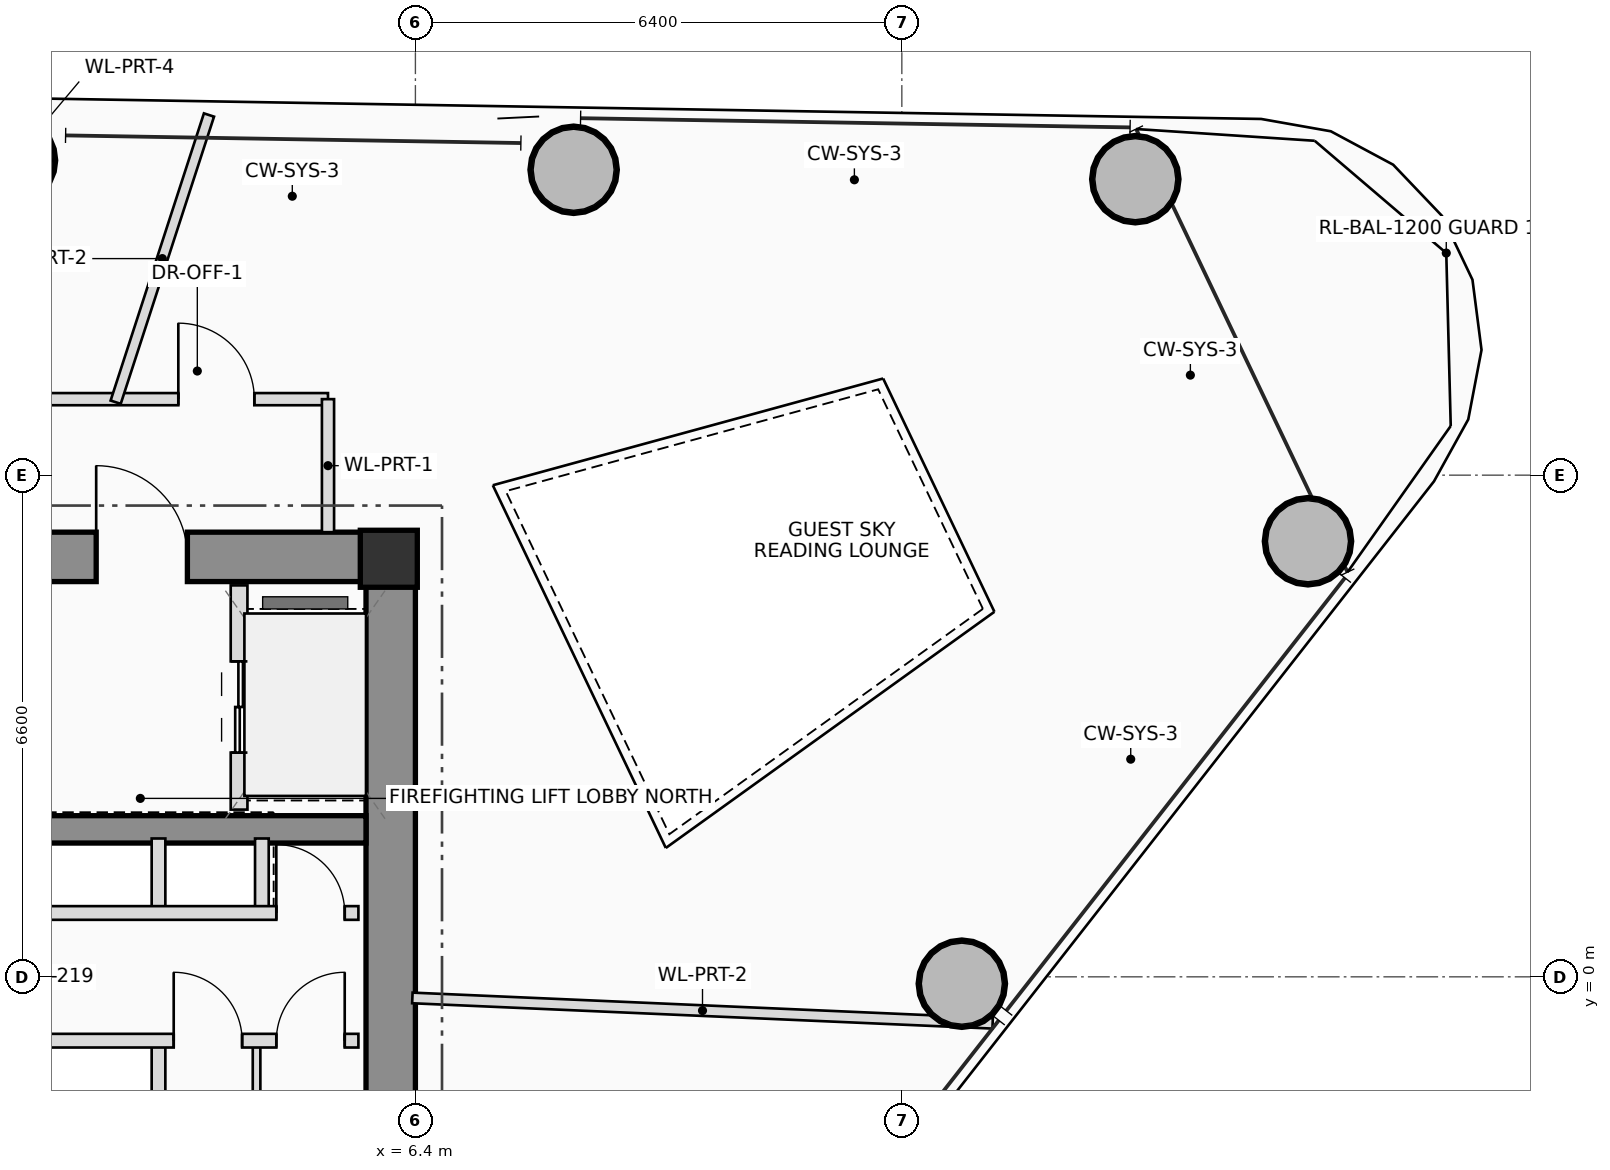
"""IFC4 building model, lengths in metres.
Left out: names, types, materials, properties, quantities, classifications, styles, units other than length and angle.
Written with IfcOpenShell. Run it as: python <this file> out.ifc"""

import sys

from ifc_helpers import new_model, si_unit, direction, frame, frame_2d, origin, origin_2d, place, context, subcontext, project, spatial, rectangle, hollow_circle, extrude, source, transform, mapped, element, fill, save


model = new_model("IFC4")
c1 = context("Model", 3, precision=1e-05, world=origin(), true_north=direction((0.0, 1.0)))
c2 = subcontext(c1, "Body", "Model", "MODEL_VIEW")
j1 = project(units=[si_unit("LENGTHUNIT", "METRE"), si_unit("PLANEANGLEUNIT", "RADIAN")], contexts=[c1])
p1 = place(None, origin())
s1 = spatial("IfcSite", under=j1, at=p1, CompositionType="ELEMENT")
p2 = place(p1, origin())
s2 = spatial("IfcBuilding", under=s1, at=p2, CompositionType="ELEMENT")
p3 = place(p2, frame((0.0, 0.0, 215.6)))
s3 = spatial("IfcBuildingStorey", under=s2, at=p3, CompositionType="ELEMENT", Elevation=215.6)
m1 = source(origin(), c2, "Body", "SweptSolid", [
    extrude(rectangle(XDim=0.75, YDim=0.75, at=origin_2d()), origin(), (0.0, 0.0, 1.0), 3.45),
])
p4 = place(p3, frame((6.05, 5.5, 0.0), z_axis=(0.0, 0.0, 1.0), x_axis=(1.0, 0.0, 0.0)))
e1 = element("IfcColumn", 1, at=p4, inside=s3, PredefinedType="COLUMN", context=c2, shape_type="MappedRepresentation", body=[
    mapped(m1, transform((0.0, 0.0, 0.0), scale=1.0)),
])
p5 = place(p3, frame((-6.4, 5.525, 0.0), z_axis=(0.0, 0.0, 1.0), x_axis=(1.0, 0.0, 0.0)))
e2 = element("IfcWall", 2, at=p5, inside=s3, PredefinedType="SHEAR", context=c2, shape_type="SweptSolid", body=[
    extrude(rectangle(XDim=12.8, YDim=0.65, at=frame_2d((6.4, 0.0))), origin(), (0.0, 0.0, 1.0), 3.45),
])
p6 = place(p5, frame((8.6, 0.0, 0.0)))
e3 = element("IfcOpeningElement", 3, at=p6, cuts=e2, PredefinedType="OPENING", context=c2, shape_type="SweptSolid", body=[
    extrude(rectangle(XDim=1.2, YDim=2.2, at=frame_2d((0.6, 1.1))), frame((0.0, 0.335, 0.0), z_axis=(0.0, -1.0, 0.0), x_axis=(1.0, 0.0, 0.0)), (0.0, 0.0, 1.0), 0.67),
])
p7 = place(p3, frame((6.075, -5.2, 0.0), z_axis=(0.0, 0.0, 1.0), x_axis=(0.0, 1.0, 0.0)))
e4 = element("IfcWall", 4, at=p7, inside=s3, PredefinedType="SHEAR", context=c2, shape_type="SweptSolid", body=[
    extrude(rectangle(XDim=10.4, YDim=0.65, at=frame_2d((5.2, 0.0))), origin(), (0.0, 0.0, 1.0), 3.45),
])
p8 = place(p3, frame((-5.75, 1.94, 0.0), z_axis=(0.0, 0.0, 1.0), x_axis=(1.0, 0.0, 0.0)))
e5 = element("IfcWall", 5, at=p8, inside=s3, PredefinedType="SHEAR", context=c2, shape_type="SweptSolid", body=[
    extrude(rectangle(XDim=11.5, YDim=0.36, at=frame_2d((5.75, 0.0))), origin(), (0.0, 0.0, 1.0), 3.45),
])
m2 = source(origin(), c2, "Body", "SweptSolid", [
    extrude(hollow_circle(Radius=0.575, WallThickness=0.042, at=origin_2d()), origin(), (0.0, 0.0, 1.0), 3.45),
])
for number, where, z_axis, x_axis in (
    (6, (13.59, -0.09, 0.0), (0.0, 0.0, 1.0), (1.0, 0.0, 0.0)),
    (7, (18.144, 5.731, 0.0), (0.0, 0.0, 1.0), (1.0, 0.0, 0.0)),
    (8, (15.872, 10.494, 0.0), (0.0, 0.0, 1.0), (1.0, 0.0, 0.0)),
    (9, (8.482, 10.618, 0.0), (0.0, 0.0, 1.0), (1.0, 0.0, 0.0)),
    (10, (1.092, 10.742, 0.0), (0.0, 0.0, 1.0), (1.0, 0.0, 0.0)),
):
    element("IfcColumn", number, at=place(p3, frame(where, z_axis=z_axis, x_axis=x_axis)), inside=s3, PredefinedType="COLUMN", context=c2, shape_type="MappedRepresentation", body=[
        mapped(m2, transform((0.0, 0.0, 0.0), scale=1.0)),
    ])
p9 = place(p3, frame((4.08, 2.2, 0.0), z_axis=(0.0, 0.0, 1.0), x_axis=(0.0, 1.0, 0.0)))
e11 = element("IfcWall", 11, at=p9, inside=s3, PredefinedType="PLUMBINGWALL", context=c2, shape_type="SweptSolid", body=[
    extrude(rectangle(XDim=2.95, YDim=0.22, at=frame_2d((1.475, 0.0))), origin(), (0.0, 0.0, 1.0), 3.21),
])
p10 = place(p9, frame((0.75, 0.0, 0.0)))
e12 = element("IfcOpeningElement", 12, at=p10, cuts=e11, PredefinedType="OPENING", context=c2, shape_type="SweptSolid", body=[
    extrude(rectangle(XDim=1.2, YDim=2.25, at=frame_2d((0.6, 1.125))), frame((0.0, 0.12, 0.0), z_axis=(0.0, -1.0, 0.0), x_axis=(1.0, 0.0, 0.0)), (0.0, 0.0, 1.0), 0.24),
])
for number, where, z_axis, x_axis in (
    (13, (3.02, 0.84, 0.0), (0.0, 0.0, 1.0), (0.0, 1.0, 0.0)),
    (14, (4.38, 0.84, 0.0), (0.0, 0.0, 1.0), (0.0, 1.0, 0.0)),
    (15, (3.02, -1.82, 0.0), (0.0, 0.0, 1.0), (0.0, 1.0, 0.0)),
):
    element("IfcWall", number, at=place(p3, frame(where, z_axis=z_axis, x_axis=x_axis)), inside=s3, PredefinedType="PLUMBINGWALL", context=c2, shape_type="SweptSolid", body=[
        extrude(rectangle(XDim=0.98, YDim=0.18, at=frame_2d((0.49, 0.0))), origin(), (0.0, 0.0, 1.0), 3.21),
    ])
p11 = place(p3, frame((4.31, -1.82, 0.0), z_axis=(0.0, 0.0, 1.0), x_axis=(0.0, 1.0, 0.0)))
e16 = element("IfcWall", 16, at=p11, inside=s3, PredefinedType="PARTITIONING", context=c2, shape_type="SweptSolid", body=[
    extrude(rectangle(XDim=0.98, YDim=0.1, at=frame_2d((0.49, 0.0))), origin(), (0.0, 0.0, 1.0), 3.21),
])
p12 = place(p3, frame((-5.68, 0.84, 0.0), z_axis=(0.0, 0.0, 1.0), x_axis=(1.0, 0.0, 0.0)))
e17 = element("IfcWall", 17, at=p12, inside=s3, PredefinedType="PLUMBINGWALL", context=c2, shape_type="SweptSolid", body=[
    extrude(rectangle(XDim=11.33, YDim=0.18, at=frame_2d((5.665, 0.0))), origin(), (0.0, 0.0, 1.0), 3.21),
])
p13 = place(p12, frame((1.58, 0.0, 0.0)))
e18 = element("IfcOpeningElement", 18, at=p13, cuts=e17, PredefinedType="OPENING", context=c2, shape_type="SweptSolid", body=[
    extrude(rectangle(XDim=0.92, YDim=2.1, at=frame_2d((0.46, 1.05))), frame((0.0, 0.1, 0.0), z_axis=(0.0, -1.0, 0.0), x_axis=(1.0, 0.0, 0.0)), (0.0, 0.0, 1.0), 0.2),
])
p14 = place(p12, frame((3.93, 0.0, 0.0)))
e19 = element("IfcOpeningElement", 19, at=p14, cuts=e17, PredefinedType="OPENING", context=c2, shape_type="SweptSolid", body=[
    extrude(rectangle(XDim=1.1, YDim=2.2, at=frame_2d((0.55, 1.1))), frame((0.0, 0.1, 0.0), z_axis=(0.0, -1.0, 0.0), x_axis=(1.0, 0.0, 0.0)), (0.0, 0.0, 1.0), 0.2),
])
p15 = place(p12, frame((5.63, 0.0, 0.0)))
e20 = element("IfcOpeningElement", 20, at=p15, cuts=e17, PredefinedType="OPENING", context=c2, shape_type="SweptSolid", body=[
    extrude(rectangle(XDim=1.1, YDim=2.2, at=frame_2d((0.55, 1.1))), frame((0.0, 0.1, 0.0), z_axis=(0.0, -1.0, 0.0), x_axis=(1.0, 0.0, 0.0)), (0.0, 0.0, 1.0), 0.2),
])
p16 = place(p12, frame((10.25, 0.0, 0.0)))
e21 = element("IfcOpeningElement", 21, at=p16, cuts=e17, PredefinedType="OPENING", context=c2, shape_type="SweptSolid", body=[
    extrude(rectangle(XDim=0.9, YDim=2.05, at=frame_2d((0.45, 1.025))), frame((0.0, 0.1, 0.0), z_axis=(0.0, -1.0, 0.0), x_axis=(1.0, 0.0, 0.0)), (0.0, 0.0, 1.0), 0.2),
])
p17 = place(p3, frame((-5.68, -0.84, 0.0), z_axis=(0.0, 0.0, 1.0), x_axis=(1.0, 0.0, 0.0)))
e22 = element("IfcWall", 22, at=p17, inside=s3, PredefinedType="PLUMBINGWALL", context=c2, shape_type="SweptSolid", body=[
    extrude(rectangle(XDim=11.33, YDim=0.18, at=frame_2d((5.665, 0.0))), origin(), (0.0, 0.0, 1.0), 3.21),
])
p18 = place(p17, frame((1.18, 0.0, 0.0)))
e23 = element("IfcOpeningElement", 23, at=p18, cuts=e22, PredefinedType="OPENING", context=c2, shape_type="SweptSolid", body=[
    extrude(rectangle(XDim=0.9, YDim=2.05, at=frame_2d((0.45, 1.025))), frame((0.0, 0.1, 0.0), z_axis=(0.0, -1.0, 0.0), x_axis=(1.0, 0.0, 0.0)), (0.0, 0.0, 1.0), 0.2),
])
p19 = place(p17, frame((3.93, 0.0, 0.0)))
e24 = element("IfcOpeningElement", 24, at=p19, cuts=e22, PredefinedType="OPENING", context=c2, shape_type="SweptSolid", body=[
    extrude(rectangle(XDim=1.1, YDim=2.2, at=frame_2d((0.55, 1.1))), frame((0.0, 0.1, 0.0), z_axis=(0.0, -1.0, 0.0), x_axis=(1.0, 0.0, 0.0)), (0.0, 0.0, 1.0), 0.2),
])
p20 = place(p17, frame((5.63, 0.0, 0.0)))
e25 = element("IfcOpeningElement", 25, at=p20, cuts=e22, PredefinedType="OPENING", context=c2, shape_type="SweptSolid", body=[
    extrude(rectangle(XDim=1.1, YDim=2.2, at=frame_2d((0.55, 1.1))), frame((0.0, 0.1, 0.0), z_axis=(0.0, -1.0, 0.0), x_axis=(1.0, 0.0, 0.0)), (0.0, 0.0, 1.0), 0.2),
])
p21 = place(p17, frame((8.9, 0.0, 0.0)))
e26 = element("IfcOpeningElement", 26, at=p21, cuts=e22, PredefinedType="OPENING", context=c2, shape_type="SweptSolid", body=[
    extrude(rectangle(XDim=0.9, YDim=2.05, at=frame_2d((0.45, 1.025))), frame((0.0, 0.1, 0.0), z_axis=(0.0, -1.0, 0.0), x_axis=(1.0, 0.0, 0.0)), (0.0, 0.0, 1.0), 0.2),
])
p22 = place(p17, frame((10.25, 0.0, 0.0)))
e27 = element("IfcOpeningElement", 27, at=p22, cuts=e22, PredefinedType="OPENING", context=c2, shape_type="SweptSolid", body=[
    extrude(rectangle(XDim=0.9, YDim=2.05, at=frame_2d((0.45, 1.025))), frame((0.0, 0.1, 0.0), z_axis=(0.0, -1.0, 0.0), x_axis=(1.0, 0.0, 0.0)), (0.0, 0.0, 1.0), 0.2),
])
p23 = place(p3, frame((-6.36, 7.6, 0.0), z_axis=(0.0, 0.0, 1.0), x_axis=(1.0, 0.0, 0.0)))
e28 = element("IfcWall", 28, at=p23, inside=s3, PredefinedType="PARTITIONING", context=c2, shape_type="SweptSolid", body=[
    extrude(rectangle(XDim=11.61, YDim=0.16, at=frame_2d((5.805, 0.0))), origin(), (0.0, 0.0, 1.0), 2.565),
])
p24 = place(p23, frame((5.479, 0.0, 0.0)))
e29 = element("IfcOpeningElement", 29, at=p24, cuts=e28, PredefinedType="OPENING", context=c2, shape_type="SweptSolid", body=[
    extrude(rectangle(XDim=1.05, YDim=2.2, at=frame_2d((0.525, 1.1))), frame((0.0, 0.09, 0.0), z_axis=(0.0, -1.0, 0.0), x_axis=(1.0, 0.0, 0.0)), (0.0, 0.0, 1.0), 0.18),
])
p25 = place(p23, frame((9.641, 0.0, 0.0)))
e30 = element("IfcOpeningElement", 30, at=p25, cuts=e28, PredefinedType="OPENING", context=c2, shape_type="SweptSolid", body=[
    extrude(rectangle(XDim=1.0, YDim=2.25, at=frame_2d((0.5, 1.125))), frame((0.0, 0.09, 0.0), z_axis=(0.0, -1.0, 0.0), x_axis=(1.0, 0.0, 0.0)), (0.0, 0.0, 1.0), 0.18),
])
p26 = place(p3, frame((5.25, 7.6, 0.0), z_axis=(0.0, 0.0, 1.0), x_axis=(0.0, -1.0, 0.0)))
e31 = element("IfcWall", 31, at=p26, inside=s3, PredefinedType="PARTITIONING", context=c2, shape_type="SweptSolid", body=[
    extrude(rectangle(XDim=1.75, YDim=0.16, at=frame_2d((0.875, 0.0))), origin(), (0.0, 0.0, 1.0), 2.565),
])
p27 = place(p3, frame((6.36, -0.278, 0.0), z_axis=(0.0, 0.0, 1.0), x_axis=(0.999047276506, -0.04364102778, 0.0)))
e32 = element("IfcWall", 32, at=p27, inside=s3, PredefinedType="PARTITIONING", context=c2, shape_type="SweptSolid", body=[
    extrude(rectangle(XDim=7.642, YDim=0.14, at=frame_2d((3.821, 0.0))), origin(), (0.0, 0.0, 1.0), 2.565),
])
p28 = place(p3, frame((2.456, 7.56, 0.0), z_axis=(0.0, 0.0, 1.0), x_axis=(0.30904716458, 0.951046712872, 0.0)))
e33 = element("IfcWall", 33, at=p28, inside=s3, PredefinedType="PARTITIONING", context=c2, shape_type="SweptSolid", body=[
    extrude(rectangle(XDim=3.973, YDim=0.14, at=frame_2d((1.986, 0.0))), origin(), (0.0, 0.0, 1.0), 2.565),
])
p29 = place(p6, origin())
e34 = element("IfcDoor", 34, at=p29, inside=s3, OperationType="SINGLE_SWING_LEFT", PredefinedType="DOOR", context=c2, shape_type="SweptSolid", body=[
    extrude(rectangle(XDim=1.2, YDim=2.2, at=frame_2d((0.6, 1.1))), frame((0.0, 0.025, 0.0), z_axis=(0.0, -1.0, 0.0), x_axis=(1.0, 0.0, 0.0)), (0.0, 0.0, 1.0), 0.05),
])
fill(e3, e34)
p30 = place(p10, origin())
e35 = element("IfcDoor", 35, at=p30, inside=s3, OperationType="DOUBLE_DOOR_SLIDING", PredefinedType="DOOR", context=c2, shape_type="SweptSolid", body=[
    extrude(rectangle(XDim=1.2, YDim=2.25, at=frame_2d((0.6, 1.125))), frame((0.0, 0.025, 0.0), z_axis=(0.0, -1.0, 0.0), x_axis=(1.0, 0.0, 0.0)), (0.0, 0.0, 1.0), 0.05),
])
fill(e12, e35)
p31 = place(p16, origin())
e36 = element("IfcDoor", 36, at=p31, inside=s3, OperationType="SINGLE_SWING_LEFT", PredefinedType="DOOR", context=c2, shape_type="SweptSolid", body=[
    extrude(rectangle(XDim=0.9, YDim=2.05, at=frame_2d((0.45, 1.025))), frame((0.0, 0.025, 0.0), z_axis=(0.0, -1.0, 0.0), x_axis=(1.0, 0.0, 0.0)), (0.0, 0.0, 1.0), 0.05),
])
fill(e21, e36)
p32 = place(p21, origin())
e37 = element("IfcDoor", 37, at=p32, inside=s3, OperationType="SINGLE_SWING_LEFT", PredefinedType="DOOR", context=c2, shape_type="SweptSolid", body=[
    extrude(rectangle(XDim=0.9, YDim=2.05, at=frame_2d((0.45, 1.025))), frame((0.0, 0.025, 0.0), z_axis=(0.0, -1.0, 0.0), x_axis=(1.0, 0.0, 0.0)), (0.0, 0.0, 1.0), 0.05),
])
fill(e26, e37)
p33 = place(p22, origin())
e38 = element("IfcDoor", 38, at=p33, inside=s3, OperationType="SINGLE_SWING_RIGHT", PredefinedType="DOOR", context=c2, shape_type="SweptSolid", body=[
    extrude(rectangle(XDim=0.9, YDim=2.05, at=frame_2d((0.45, 1.025))), frame((0.0, 0.025, 0.0), z_axis=(0.0, -1.0, 0.0), x_axis=(1.0, 0.0, 0.0)), (0.0, 0.0, 1.0), 0.05),
])
fill(e27, e38)
p34 = place(p25, origin())
e39 = element("IfcDoor", 39, at=p34, inside=s3, OperationType="SINGLE_SWING_LEFT", PredefinedType="DOOR", context=c2, shape_type="SweptSolid", body=[
    extrude(rectangle(XDim=1.0, YDim=2.25, at=frame_2d((0.5, 1.125))), frame((0.0, 0.025, 0.0), z_axis=(0.0, -1.0, 0.0), x_axis=(1.0, 0.0, 0.0)), (0.0, 0.0, 1.0), 0.05),
])
fill(e30, e39)
save(model, sys.argv[1])
